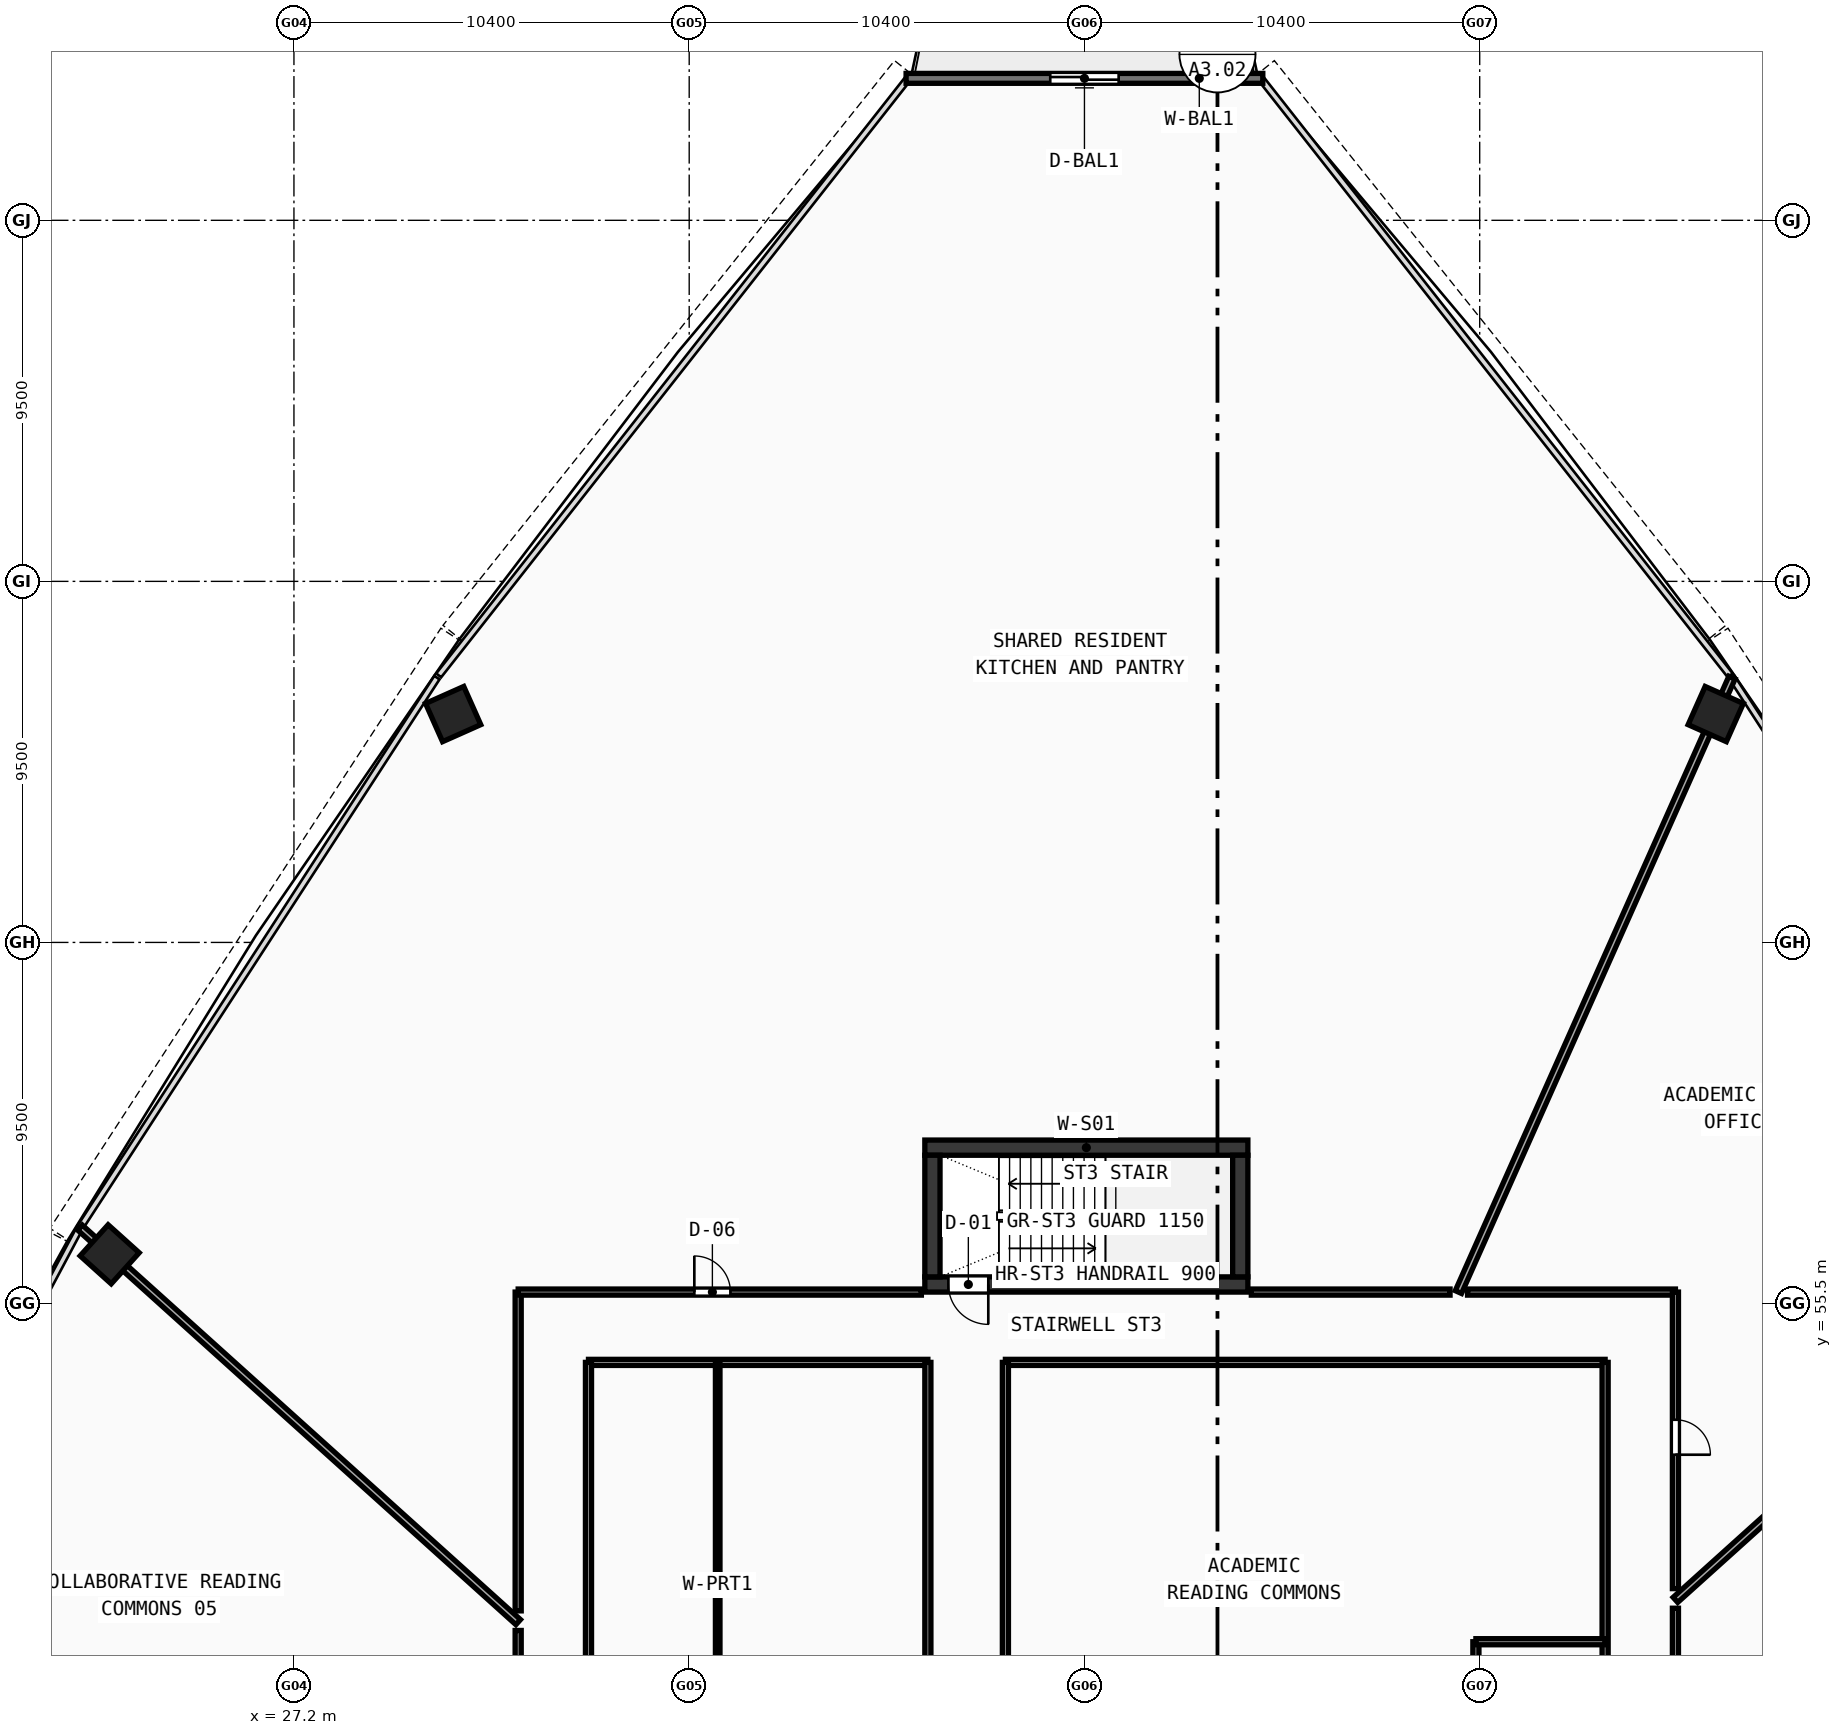
"""IFC4 building model, lengths in metres.
Left out: names, types, materials, properties, quantities, classifications, styles, units other than length and angle.
Written with IfcOpenShell. Run it as: python <this file> out.ifc"""

import sys

from ifc_helpers import new_model, si_unit, direction, frame, frame_2d, origin, origin_with_axes, origin_2d, place, context, subcontext, project, spatial, rectangle, hollow_rectangle, extrude, source, transform, mapped, element, fill, save


model = new_model("IFC4")
c1 = context("Model", 3, precision=1e-05, world=origin(), true_north=direction((0.0, 1.0)))
c2 = subcontext(c1, "Body", "Model", "MODEL_VIEW")
j1 = project(units=[si_unit("LENGTHUNIT", "METRE"), si_unit("PLANEANGLEUNIT", "RADIAN")], contexts=[c1])
p1 = place(None, origin())
s1 = spatial("IfcSite", under=j1, at=p1, CompositionType="ELEMENT")
p2 = place(p1, origin())
s2 = spatial("IfcBuilding", under=s1, at=p2, CompositionType="ELEMENT")
p3 = place(p2, frame((0.0, 0.0, 63.07)))
s3 = spatial("IfcBuildingStorey", under=s2, at=p3, CompositionType="ELEMENT", Elevation=63.07)
p4 = place(p3, frame((43.8, 59.6, 0.0), z_axis=(0.0, 0.0, 1.0), x_axis=(1.0, 0.0, 0.0)))
e1 = element("IfcWall", 1, at=p4, inside=s3, PredefinedType="SHEAR", context=c2, shape_type="SweptSolid", body=[
    extrude(rectangle(XDim=8.5, YDim=0.4, at=frame_2d((4.25, 0.0))), origin(), (0.0, 0.0, 1.0), 3.37),
])
p5 = place(p3, frame((43.8, 56.0, 0.0), z_axis=(0.0, 0.0, 1.0), x_axis=(1.0, 0.0, 0.0)))
e2 = element("IfcWall", 2, at=p5, inside=s3, PredefinedType="SHEAR", context=c2, shape_type="SweptSolid", body=[
    extrude(rectangle(XDim=8.5, YDim=0.4, at=frame_2d((4.25, 0.0))), origin(), (0.0, 0.0, 1.0), 3.37),
])
p6 = place(p5, frame((0.62, 0.0, 0.0)))
e3 = element("IfcOpeningElement", 3, at=p6, cuts=e2, PredefinedType="OPENING", context=c2, shape_type="SweptSolid", body=[
    extrude(rectangle(XDim=1.05, YDim=2.1, at=frame_2d((0.525, 1.05))), frame((0.0, 0.21, 0.0), z_axis=(0.0, -1.0, 0.0), x_axis=(1.0, 0.0, 0.0)), (0.0, 0.0, 1.0), 0.42),
])
for number, where, z_axis, x_axis in (
    (4, (44.0, 56.2, 0.0), (0.0, 0.0, 1.0), (0.0, 1.0, 0.0)),
    (5, (52.1, 56.2, 0.0), (0.0, 0.0, 1.0), (0.0, 1.0, 0.0)),
):
    element("IfcWall", number, at=place(p3, frame(where, z_axis=z_axis, x_axis=x_axis)), inside=s3, PredefinedType="SHEAR", context=c2, shape_type="SweptSolid", body=[
        extrude(rectangle(XDim=3.2, YDim=0.4, at=frame_2d((1.6, 0.0))), origin(), (0.0, 0.0, 1.0), 3.37),
    ])
m1 = source(origin(), c2, "Body", "SweptSolid", [
    extrude(hollow_rectangle(XDim=1.1, YDim=1.1, WallThickness=0.045, at=origin_2d()), origin(), (0.0, 0.0, 1.0), 3.63),
])
for number, where, z_axis, x_axis in (
    (6, (64.611, 71.009, -0.26), (0.0, 0.0, 1.0), (-0.914, 0.407, 0.0)),
    (7, (31.389, 71.009, -0.26), (0.0, 0.0, 1.0), (-0.914, -0.407, 0.0)),
    (8, (22.351, 56.794, -0.26), (0.0, 0.0, 1.0), (-0.669, -0.743, 0.0)),
):
    element("IfcColumn", number, at=place(p3, frame(where, z_axis=z_axis, x_axis=x_axis)), inside=s3, PredefinedType="COLUMN", context=c2, shape_type="MappedRepresentation", body=[
        mapped(m1, transform((0.0, 0.0, 0.0), scale=1.0)),
    ])
p7 = place(p3, frame((52.693, 87.735, 0.0), z_axis=(0.0, 0.0, 1.0), x_axis=(-1.0, 0.0, 0.0)))
e9 = element("IfcWall", 9, at=p7, inside=s3, PredefinedType="STANDARD", context=c2, shape_type="SweptSolid", body=[
    extrude(rectangle(XDim=9.386, YDim=0.26, at=frame_2d((4.693, 0.0))), origin(), (0.0, 0.0, 1.0), 3.37),
])
p8 = place(p7, frame((3.793, 0.0, 0.0)))
e10 = element("IfcOpeningElement", 10, at=p8, cuts=e9, PredefinedType="OPENING", context=c2, shape_type="SweptSolid", body=[
    extrude(rectangle(XDim=1.8, YDim=2.15, at=frame_2d((0.9, 1.075))), frame((0.0, 0.14, 0.0), z_axis=(0.0, -1.0, 0.0), x_axis=(1.0, 0.0, 0.0)), (0.0, 0.0, 1.0), 0.28),
])
p9 = place(p3, frame((34.95, 53.95, 0.0), z_axis=(0.0, 0.0, 1.0), x_axis=(1.0, 0.0, 0.0)))
e11 = element("IfcWall", 11, at=p9, inside=s3, PredefinedType="PARTITIONING", context=c2, shape_type="SweptSolid", body=[
    extrude(rectangle(XDim=8.93, YDim=0.16, at=frame_2d((4.465, 0.0))), origin(), (0.0, 0.0, 1.0), 2.67),
])
for number, where, z_axis, x_axis in (
    (12, (34.95, 42.25, 0.0), (0.0, 0.0, 1.0), (0.0, 1.0, 0.0)),
    (13, (43.88, 42.25, 0.0), (0.0, 0.0, 1.0), (0.0, 1.0, 0.0)),
):
    element("IfcWall", number, at=place(p3, frame(where, z_axis=z_axis, x_axis=x_axis)), inside=s3, PredefinedType="PARTITIONING", context=c2, shape_type="SweptSolid", body=[
        extrude(rectangle(XDim=11.7, YDim=0.16, at=frame_2d((5.85, 0.0))), origin(), (0.0, 0.0, 1.0), 2.67),
    ])
p10 = place(p3, frame((38.35, 42.25, 0.0), z_axis=(0.0, 0.0, 1.0), x_axis=(0.0, 1.0, 0.0)))
e14 = element("IfcWall", 14, at=p10, inside=s3, PredefinedType="PARTITIONING", context=c2, shape_type="SweptSolid", body=[
    extrude(rectangle(XDim=11.7, YDim=0.12, at=frame_2d((5.85, 0.0))), origin(), (0.0, 0.0, 1.0), 2.67),
])
p11 = place(p3, frame((45.92, 53.95, 0.0), z_axis=(0.0, 0.0, 1.0), x_axis=(1.0, 0.0, 0.0)))
e15 = element("IfcWall", 15, at=p11, inside=s3, PredefinedType="PARTITIONING", context=c2, shape_type="SweptSolid", body=[
    extrude(rectangle(XDim=15.78, YDim=0.16, at=frame_2d((7.89, 0.0))), origin(), (0.0, 0.0, 1.0), 2.67),
])
p12 = place(p3, frame((45.92, 42.25, 0.0), z_axis=(0.0, 0.0, 1.0), x_axis=(0.0, 1.0, 0.0)))
e16 = element("IfcWall", 16, at=p12, inside=s3, PredefinedType="PARTITIONING", context=c2, shape_type="SweptSolid", body=[
    extrude(rectangle(XDim=11.7, YDim=0.16, at=frame_2d((5.85, 0.0))), origin(), (0.0, 0.0, 1.0), 2.97),
])
p13 = place(p3, frame((61.7, 42.25, 0.0), z_axis=(0.0, 0.0, 1.0), x_axis=(0.0, 1.0, 0.0)))
e17 = element("IfcWall", 17, at=p13, inside=s3, PredefinedType="PARTITIONING", context=c2, shape_type="SweptSolid", body=[
    extrude(rectangle(XDim=11.7, YDim=0.16, at=frame_2d((5.85, 0.0))), origin(), (0.0, 0.0, 1.0), 2.67),
])
p14 = place(p3, frame((58.3, 42.25, 0.0), z_axis=(0.0, 0.0, 1.0), x_axis=(0.0, 1.0, 0.0)))
e18 = element("IfcWall", 18, at=p14, inside=s3, PredefinedType="PARTITIONING", context=c2, shape_type="SweptSolid", body=[
    extrude(rectangle(XDim=4.35, YDim=0.16, at=frame_2d((2.175, 0.0))), origin(), (0.0, 0.0, 1.0), 2.67),
])
p15 = place(p3, frame((58.3, 46.6, 0.0), z_axis=(0.0, 0.0, 1.0), x_axis=(1.0, 0.0, 0.0)))
e19 = element("IfcWall", 19, at=p15, inside=s3, PredefinedType="PARTITIONING", context=c2, shape_type="SweptSolid", body=[
    extrude(rectangle(XDim=3.4, YDim=0.16, at=frame_2d((1.7, 0.0))), origin(), (0.0, 0.0, 1.0), 2.97),
])
p16 = place(p3, frame((63.55, 47.701, 0.0), z_axis=(0.0, 0.0, 1.0), x_axis=(0.743144860423, 0.669130567547, 0.0)))
e20 = element("IfcWall", 20, at=p16, inside=s3, PredefinedType="PARTITIONING", context=c2, shape_type="SweptSolid", body=[
    extrude(rectangle(XDim=14.639, YDim=0.18, at=frame_2d((7.319, 0.0))), origin(), (0.0, 0.0, 1.0), 2.67),
])
p17 = place(p3, frame((57.84, 55.8, 0.0), z_axis=(0.0, 0.0, 1.0), x_axis=(0.406732277088, 0.913547401493, 0.0)))
e21 = element("IfcWall", 21, at=p17, inside=s3, PredefinedType="PARTITIONING", context=c2, shape_type="SweptSolid", body=[
    extrude(rectangle(XDim=17.698, YDim=0.18, at=frame_2d((8.849, 0.0))), origin(), (0.0, 0.0, 1.0), 2.67),
])
p18 = place(p3, frame((33.1, 47.116, 0.0), z_axis=(0.0, 0.0, 1.0), x_axis=(-0.743143105339, 0.669132516761, 0.0)))
e22 = element("IfcWall", 22, at=p18, inside=s3, PredefinedType="PARTITIONING", context=c2, shape_type="SweptSolid", body=[
    extrude(rectangle(XDim=15.514, YDim=0.18, at=frame_2d((7.757, 0.0))), origin(), (0.0, 0.0, 1.0), 2.67),
])
p19 = place(p3, frame((33.1, 38.773, 0.0), z_axis=(0.0, 0.0, 1.0), x_axis=(0.0, 1.0, 0.0)))
e23 = element("IfcWall", 23, at=p19, inside=s3, PredefinedType="PARTITIONING", context=c2, shape_type="SweptSolid", body=[
    extrude(rectangle(XDim=8.124, YDim=0.16, at=frame_2d((4.062, 0.0))), origin(), (0.0, 0.0, 1.0), 2.67),
])
p20 = place(p19, frame((3.581, 0.0, 0.0)))
e24 = element("IfcOpeningElement", 24, at=p20, cuts=e23, PredefinedType="OPENING", context=c2, shape_type="SweptSolid", body=[
    extrude(rectangle(XDim=0.95, YDim=2.1, at=frame_2d((0.475, 1.05))), frame((0.0, 0.09, 0.0), z_axis=(0.0, -1.0, 0.0), x_axis=(1.0, 0.0, 0.0)), (0.0, 0.0, 1.0), 0.18),
])
p21 = place(p3, frame((33.1, 47.412, 0.0), z_axis=(0.0, 0.0, 1.0), x_axis=(0.0, 1.0, 0.0)))
e25 = element("IfcWall", 25, at=p21, inside=s3, PredefinedType="PARTITIONING", context=c2, shape_type="SweptSolid", body=[
    extrude(rectangle(XDim=8.388, YDim=0.16, at=frame_2d((4.194, 0.0))), origin(), (0.0, 0.0, 1.0), 3.37),
])
p22 = place(p3, frame((33.1, 55.8, 0.0), z_axis=(0.0, 0.0, 1.0), x_axis=(1.0, 0.0, 0.0)))
e26 = element("IfcWall", 26, at=p22, inside=s3, PredefinedType="PARTITIONING", context=c2, shape_type="SweptSolid", body=[
    extrude(rectangle(XDim=10.609, YDim=0.16, at=frame_2d((5.304, 0.0))), origin(), (0.0, 0.0, 1.0), 2.67),
])
p23 = place(p22, frame((4.635, 0.0, 0.0)))
e27 = element("IfcOpeningElement", 27, at=p23, cuts=e26, PredefinedType="OPENING", context=c2, shape_type="SweptSolid", body=[
    extrude(rectangle(XDim=0.95, YDim=2.1, at=frame_2d((0.475, 1.05))), frame((0.0, 0.09, 0.0), z_axis=(0.0, -1.0, 0.0), x_axis=(1.0, 0.0, 0.0)), (0.0, 0.0, 1.0), 0.18),
])
p24 = place(p3, frame((52.391, 55.8, 0.0), z_axis=(0.0, 0.0, 1.0), x_axis=(1.0, 0.0, 0.0)))
e28 = element("IfcWall", 28, at=p24, inside=s3, PredefinedType="PARTITIONING", context=c2, shape_type="SweptSolid", body=[
    extrude(rectangle(XDim=5.229, YDim=0.16, at=frame_2d((2.614, 0.0))), origin(), (0.0, 0.0, 1.0), 2.67),
])
p25 = place(p3, frame((58.08, 55.8, 0.0), z_axis=(0.0, 0.0, 1.0), x_axis=(1.0, 0.0, 0.0)))
e29 = element("IfcWall", 29, at=p25, inside=s3, PredefinedType="PARTITIONING", context=c2, shape_type="SweptSolid", body=[
    extrude(rectangle(XDim=5.47, YDim=0.16, at=frame_2d((2.735, 0.0))), origin(), (0.0, 0.0, 1.0), 3.37),
])
p26 = place(p3, frame((63.55, 55.8, 0.0), z_axis=(0.0, 0.0, 1.0), x_axis=(0.0, -1.0, 0.0)))
e30 = element("IfcWall", 30, at=p26, inside=s3, PredefinedType="PARTITIONING", context=c2, shape_type="SweptSolid", body=[
    extrude(rectangle(XDim=7.803, YDim=0.16, at=frame_2d((3.901, 0.0))), origin(), (0.0, 0.0, 1.0), 3.37),
])
p27 = place(p26, frame((3.359, 0.0, 0.0)))
e31 = element("IfcOpeningElement", 31, at=p27, cuts=e30, PredefinedType="OPENING", context=c2, shape_type="SweptSolid", body=[
    extrude(rectangle(XDim=0.92, YDim=2.1, at=frame_2d((0.46, 1.05))), frame((0.0, 0.09, 0.0), z_axis=(0.0, -1.0, 0.0), x_axis=(1.0, 0.0, 0.0)), (0.0, 0.0, 1.0), 0.18),
])
p28 = place(p3, frame((63.55, 47.482, 0.0), z_axis=(0.0, 0.0, 1.0), x_axis=(0.0, -1.0, 0.0)))
e32 = element("IfcWall", 32, at=p28, inside=s3, PredefinedType="PARTITIONING", context=c2, shape_type="SweptSolid", body=[
    extrude(rectangle(XDim=8.498, YDim=0.16, at=frame_2d((4.249, 0.0))), origin(), (0.0, 0.0, 1.0), 2.67),
])
p29 = place(p28, frame((3.795, 0.0, 0.0)))
e33 = element("IfcOpeningElement", 33, at=p29, cuts=e32, PredefinedType="OPENING", context=c2, shape_type="SweptSolid", body=[
    extrude(rectangle(XDim=0.92, YDim=2.1, at=frame_2d((0.46, 1.05))), frame((0.0, 0.09, 0.0), z_axis=(0.0, -1.0, 0.0), x_axis=(1.0, 0.0, 0.0)), (0.0, 0.0, 1.0), 0.18),
])
m2 = source(origin(), c2, "Body", "SweptSolid", [
    extrude(rectangle(XDim=1.8, YDim=2.15, at=frame_2d((0.9, 1.075))), frame((0.0, 0.025, 0.0), z_axis=(0.0, -1.0, 0.0), x_axis=(1.0, 0.0, 0.0)), (0.0, 0.0, 1.0), 0.05),
])
p30 = place(p8, origin_with_axes())
e34 = element("IfcDoor", 34, at=p30, inside=s3, OperationType="DOUBLE_DOOR_SLIDING", PredefinedType="DOOR", context=c2, shape_type="MappedRepresentation", body=[
    mapped(m2, transform((0.0, 0.0, 0.0), scale=1.0)),
])
fill(e10, e34)
m3 = source(origin(), c2, "Body", "SweptSolid", [
    extrude(rectangle(XDim=1.05, YDim=2.1, at=frame_2d((0.525, 1.05))), frame((0.0, 0.025, 0.0), z_axis=(0.0, -1.0, 0.0), x_axis=(1.0, 0.0, 0.0)), (0.0, 0.0, 1.0), 0.05),
])
p31 = place(p6, frame((1.05, 0.0, 0.0), z_axis=(0.0, 0.0, 1.0), x_axis=(-1.0, 0.0, 0.0)))
e35 = element("IfcDoor", 35, at=p31, inside=s3, OperationType="SINGLE_SWING_LEFT", PredefinedType="DOOR", context=c2, shape_type="MappedRepresentation", body=[
    mapped(m3, transform((0.0, 0.0, 0.0), scale=1.0)),
])
fill(e3, e35)
m4 = source(origin(), c2, "Body", "SweptSolid", [
    extrude(rectangle(XDim=0.92, YDim=2.1, at=frame_2d((0.46, 1.05))), frame((0.0, 0.025, 0.0), z_axis=(0.0, -1.0, 0.0), x_axis=(1.0, 0.0, 0.0)), (0.0, 0.0, 1.0), 0.05),
])
p32 = place(p27, origin_with_axes())
e36 = element("IfcDoor", 36, at=p32, inside=s3, OperationType="SINGLE_SWING_RIGHT", PredefinedType="DOOR", context=c2, shape_type="MappedRepresentation", body=[
    mapped(m4, transform((0.0, 0.0, 0.0), scale=1.0)),
])
fill(e31, e36)
m5 = source(origin(), c2, "Body", "SweptSolid", [
    extrude(rectangle(XDim=0.95, YDim=2.1, at=frame_2d((0.475, 1.05))), frame((0.0, 0.025, 0.0), z_axis=(0.0, -1.0, 0.0), x_axis=(1.0, 0.0, 0.0)), (0.0, 0.0, 1.0), 0.05),
])
p33 = place(p23, origin_with_axes())
e37 = element("IfcDoor", 37, at=p33, inside=s3, OperationType="SINGLE_SWING_LEFT", PredefinedType="DOOR", context=c2, shape_type="MappedRepresentation", body=[
    mapped(m5, transform((0.0, 0.0, 0.0), scale=1.0)),
])
fill(e27, e37)
save(model, sys.argv[1])
